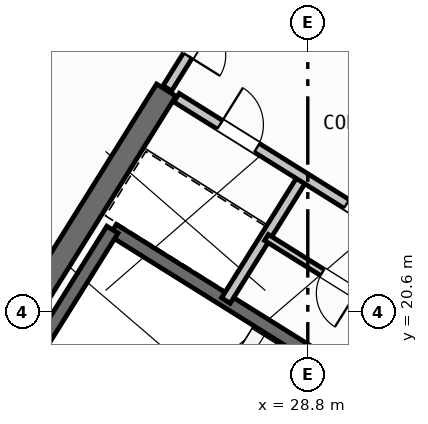
"""IFC4 building model, lengths in metres.
Left out: names, types, materials, properties, quantities, classifications, styles, units other than length and angle.
Written with IfcOpenShell. Run it as: python <this file> out.ifc"""

import sys

from ifc_helpers import new_model, si_unit, direction, frame, frame_2d, origin, place, context, subcontext, project, spatial, rectangle, extrude, source, transform, mapped, element, fill, save


model = new_model("IFC4")
c1 = context("Model", 3, precision=1e-05, world=origin(), true_north=direction((0.0, 1.0)))
c2 = subcontext(c1, "Body", "Model", "MODEL_VIEW")
j1 = project(units=[si_unit("LENGTHUNIT", "METRE"), si_unit("PLANEANGLEUNIT", "RADIAN")], contexts=[c1])
p1 = place(None, origin())
s1 = spatial("IfcSite", under=j1, at=p1, CompositionType="ELEMENT")
p2 = place(p1, origin())
s2 = spatial("IfcBuilding", under=s1, at=p2, CompositionType="ELEMENT")
p3 = place(p2, frame((0.0, 0.0, 262.8)))
s3 = spatial("IfcBuildingStorey", under=s2, at=p3, CompositionType="ELEMENT", Elevation=262.8)
p4 = place(p3, frame((40.531, 24.036, 0.0), z_axis=(0.0, 0.0, 1.0), x_axis=(-0.848048787466, 0.529918157905, 0.0)))
e1 = element("IfcWall", 1, at=p4, inside=s3, PredefinedType="SHEAR", context=c2, shape_type="SweptSolid", body=[
    extrude(rectangle(XDim=13.04, YDim=0.45, at=frame_2d((6.52, 0.0))), origin(), (0.0, 0.0, 1.0), 3.35),
])
p5 = place(p3, frame((26.007, 24.976, 0.0), z_axis=(0.0, 0.0, 1.0), x_axis=(-0.529931155655, -0.848040665456, 0.0)))
e2 = element("IfcWall", 2, at=p5, inside=s3, PredefinedType="SHEAR", context=c2, shape_type="SweptSolid", body=[
    extrude(rectangle(XDim=6.475, YDim=0.45, at=frame_2d((3.238, 0.0))), origin(), (0.0, 0.0, 1.0), 3.35),
])
p6 = place(p3, frame((29.268, 6.429, 0.0), z_axis=(0.0, 0.0, 1.0), x_axis=(-0.848049971435, 0.529916263149, 0.0)))
e3 = element("IfcWall", 3, at=p6, inside=s3, PredefinedType="STANDARD", context=c2, shape_type="SweptSolid", body=[
    extrude(rectangle(XDim=31.588, YDim=0.32, at=frame_2d((15.794, 0.0))), origin(), (0.0, 0.0, 1.0), 3.35),
])
p7 = place(p6, frame((16.362, 0.0, 0.0)))
e4 = element("IfcOpeningElement", 4, at=p7, cuts=e3, PredefinedType="OPENING", context=c2, shape_type="SweptSolid", body=[
    extrude(rectangle(XDim=1.2, YDim=2.15, at=frame_2d((0.6, 1.075))), frame((0.0, 0.17, 0.0), z_axis=(0.0, -1.0, 0.0), x_axis=(1.0, 0.0, 0.0)), (0.0, 0.0, 1.0), 0.34),
])
p8 = place(p6, frame((3.859, 0.0, 0.9)))
e5 = element("IfcOpeningElement", 5, at=p8, cuts=e3, PredefinedType="OPENING", context=c2, shape_type="SweptSolid", body=[
    extrude(rectangle(XDim=1.65, YDim=1.45, at=frame_2d((0.825, 0.725))), frame((0.0, 0.17, 0.0), z_axis=(0.0, -1.0, 0.0), x_axis=(1.0, 0.0, 0.0)), (0.0, 0.0, 1.0), 0.34),
])
p9 = place(p6, frame((10.519, 0.0, 0.9)))
e6 = element("IfcOpeningElement", 6, at=p9, cuts=e3, PredefinedType="OPENING", context=c2, shape_type="SweptSolid", body=[
    extrude(rectangle(XDim=1.65, YDim=1.45, at=frame_2d((0.825, 0.725))), frame((0.0, 0.17, 0.0), z_axis=(0.0, -1.0, 0.0), x_axis=(1.0, 0.0, 0.0)), (0.0, 0.0, 1.0), 0.34),
])
p10 = place(p6, frame((20.015, 0.0, 0.95)))
e7 = element("IfcOpeningElement", 7, at=p10, cuts=e3, PredefinedType="OPENING", context=c2, shape_type="SweptSolid", body=[
    extrude(rectangle(XDim=1.95, YDim=1.35, at=frame_2d((0.975, 0.675))), frame((0.0, 0.17, 0.0), z_axis=(0.0, -1.0, 0.0), x_axis=(1.0, 0.0, 0.0)), (0.0, 0.0, 1.0), 0.34),
])
p11 = place(p6, frame((23.715, 0.0, 1.0)))
e8 = element("IfcOpeningElement", 8, at=p11, cuts=e3, PredefinedType="OPENING", context=c2, shape_type="SweptSolid", body=[
    extrude(rectangle(XDim=0.9, YDim=1.25, at=frame_2d((0.45, 0.625))), frame((0.0, 0.17, 0.0), z_axis=(0.0, -1.0, 0.0), x_axis=(1.0, 0.0, 0.0)), (0.0, 0.0, 1.0), 0.34),
])
p12 = place(p6, frame((26.391, 0.0, 0.9)))
e9 = element("IfcOpeningElement", 9, at=p12, cuts=e3, PredefinedType="OPENING", context=c2, shape_type="SweptSolid", body=[
    extrude(rectangle(XDim=1.65, YDim=1.45, at=frame_2d((0.825, 0.725))), frame((0.0, 0.17, 0.0), z_axis=(0.0, -1.0, 0.0), x_axis=(1.0, 0.0, 0.0)), (0.0, 0.0, 1.0), 0.34),
])
p13 = place(p6, frame((29.878, 0.0, 1.0)))
e10 = element("IfcOpeningElement", 10, at=p13, cuts=e3, PredefinedType="OPENING", context=c2, shape_type="SweptSolid", body=[
    extrude(rectangle(XDim=0.9, YDim=1.25, at=frame_2d((0.45, 0.625))), frame((0.0, 0.17, 0.0), z_axis=(0.0, -1.0, 0.0), x_axis=(1.0, 0.0, 0.0)), (0.0, 0.0, 1.0), 0.34),
])
p14 = place(p3, frame((14.138, 41.825, 0.0), z_axis=(0.0, 0.0, 1.0), x_axis=(0.848046498049, -0.529921821731, 0.0)))
e11 = element("IfcWall", 11, at=p14, inside=s3, PredefinedType="STANDARD", context=c2, shape_type="SweptSolid", body=[
    extrude(rectangle(XDim=31.588, YDim=0.32, at=frame_2d((15.794, 0.0))), origin(), (0.0, 0.0, 1.0), 3.35),
])
p15 = place(p14, frame((3.568, 0.0, 0.0)))
e12 = element("IfcOpeningElement", 12, at=p15, cuts=e11, PredefinedType="OPENING", context=c2, shape_type="SweptSolid", body=[
    extrude(rectangle(XDim=1.05, YDim=2.15, at=frame_2d((0.525, 1.075))), frame((0.0, 0.17, 0.0), z_axis=(0.0, -1.0, 0.0), x_axis=(1.0, 0.0, 0.0)), (0.0, 0.0, 1.0), 0.34),
])
p16 = place(p14, frame((1.046, 0.0, 0.9)))
e13 = element("IfcOpeningElement", 13, at=p16, cuts=e11, PredefinedType="OPENING", context=c2, shape_type="SweptSolid", body=[
    extrude(rectangle(XDim=1.65, YDim=1.45, at=frame_2d((0.825, 0.725))), frame((0.0, 0.17, 0.0), z_axis=(0.0, -1.0, 0.0), x_axis=(1.0, 0.0, 0.0)), (0.0, 0.0, 1.0), 0.34),
])
p17 = place(p14, frame((8.61, 0.0, 0.9)))
e14 = element("IfcOpeningElement", 14, at=p17, cuts=e11, PredefinedType="OPENING", context=c2, shape_type="SweptSolid", body=[
    extrude(rectangle(XDim=1.35, YDim=1.45, at=frame_2d((0.675, 0.725))), frame((0.0, 0.17, 0.0), z_axis=(0.0, -1.0, 0.0), x_axis=(1.0, 0.0, 0.0)), (0.0, 0.0, 1.0), 0.34),
])
p18 = place(p14, frame((13.599, 0.0, 0.95)))
e15 = element("IfcOpeningElement", 15, at=p18, cuts=e11, PredefinedType="OPENING", context=c2, shape_type="SweptSolid", body=[
    extrude(rectangle(XDim=1.95, YDim=1.35, at=frame_2d((0.975, 0.675))), frame((0.0, 0.17, 0.0), z_axis=(0.0, -1.0, 0.0), x_axis=(1.0, 0.0, 0.0)), (0.0, 0.0, 1.0), 0.34),
])
p19 = place(p14, frame((17.154, 0.0, 1.0)))
e16 = element("IfcOpeningElement", 16, at=p19, cuts=e11, PredefinedType="OPENING", context=c2, shape_type="SweptSolid", body=[
    extrude(rectangle(XDim=0.9, YDim=1.25, at=frame_2d((0.45, 0.625))), frame((0.0, 0.17, 0.0), z_axis=(0.0, -1.0, 0.0), x_axis=(1.0, 0.0, 0.0)), (0.0, 0.0, 1.0), 0.34),
])
p20 = place(p14, frame((21.719, 0.0, 0.9)))
e17 = element("IfcOpeningElement", 17, at=p20, cuts=e11, PredefinedType="OPENING", context=c2, shape_type="SweptSolid", body=[
    extrude(rectangle(XDim=1.65, YDim=1.45, at=frame_2d((0.825, 0.725))), frame((0.0, 0.17, 0.0), z_axis=(0.0, -1.0, 0.0), x_axis=(1.0, 0.0, 0.0)), (0.0, 0.0, 1.0), 0.34),
])
p21 = place(p14, frame((27.419, 0.0, 0.9)))
e18 = element("IfcOpeningElement", 18, at=p21, cuts=e11, PredefinedType="OPENING", context=c2, shape_type="SweptSolid", body=[
    extrude(rectangle(XDim=1.65, YDim=1.45, at=frame_2d((0.825, 0.725))), frame((0.0, 0.17, 0.0), z_axis=(0.0, -1.0, 0.0), x_axis=(1.0, 0.0, 0.0)), (0.0, 0.0, 1.0), 0.34),
])
p22 = place(p3, frame((31.28, 18.261, 0.0), z_axis=(0.0, 0.0, 1.0), x_axis=(-0.848051618787, 0.529913626805, 0.0)))
e19 = element("IfcWall", 19, at=p22, inside=s3, PredefinedType="SHEAR", context=c2, shape_type="SweptSolid", body=[
    extrude(rectangle(XDim=7.46, YDim=0.26, at=frame_2d((3.73, 0.0))), origin(), (0.0, 0.0, 1.0), 3.35),
])
p23 = place(p22, frame((0.36, 0.0, 0.0)))
e20 = element("IfcOpeningElement", 20, at=p23, cuts=e19, PredefinedType="OPENING", context=c2, shape_type="SweptSolid", body=[
    extrude(rectangle(XDim=0.86, YDim=2.05, at=frame_2d((0.43, 1.025))), frame((0.0, 0.14, 0.0), z_axis=(0.0, -1.0, 0.0), x_axis=(1.0, 0.0, 0.0)), (0.0, 0.0, 1.0), 0.28),
])
p24 = place(p3, frame((24.945, 22.22, 0.0), z_axis=(0.0, 0.0, 1.0), x_axis=(-0.529908658664, -0.84805472316, 0.0)))
e21 = element("IfcWall", 21, at=p24, inside=s3, PredefinedType="SHEAR", context=c2, shape_type="SweptSolid", body=[
    extrude(rectangle(XDim=3.16, YDim=0.26, at=frame_2d((1.58, 0.0))), origin(), (0.0, 0.0, 1.0), 3.35),
])
p25 = place(p3, frame((31.822, 24.998, 0.0), z_axis=(0.0, 0.0, 1.0), x_axis=(-0.848054125777, 0.529909614701, 0.0)))
e22 = element("IfcWall", 22, at=p25, inside=s3, PredefinedType="STANDARD", context=c2, shape_type="SweptSolid", body=[
    extrude(rectangle(XDim=4.668, YDim=0.2, at=frame_2d((2.334, 0.0))), origin(), (0.0, 0.0, 1.0), 3.34),
])
p26 = place(p25, frame((0.52, 0.0, 0.0)))
e23 = element("IfcOpeningElement", 23, at=p26, cuts=e22, PredefinedType="OPENING", context=c2, shape_type="SweptSolid", body=[
    extrude(rectangle(XDim=1.2, YDim=2.15, at=frame_2d((0.6, 1.075))), frame((0.0, 0.11, 0.0), z_axis=(0.0, -1.0, 0.0), x_axis=(1.0, 0.0, 0.0)), (0.0, 0.0, 1.0), 0.22),
])
p27 = place(p25, frame((2.54, 0.0, 0.0)))
e24 = element("IfcOpeningElement", 24, at=p27, cuts=e22, PredefinedType="OPENING", context=c2, shape_type="SweptSolid", body=[
    extrude(rectangle(XDim=1.2, YDim=2.15, at=frame_2d((0.6, 1.075))), frame((0.0, 0.11, 0.0), z_axis=(0.0, -1.0, 0.0), x_axis=(1.0, 0.0, 0.0)), (0.0, 0.0, 1.0), 0.22),
])
p28 = place(p3, frame((28.71, 23.263, 0.0), z_axis=(0.0, 0.0, 1.0), x_axis=(-0.529907497854, -0.848055448493, 0.0)))
e25 = element("IfcWall", 25, at=p28, inside=s3, PredefinedType="STANDARD", context=c2, shape_type="SweptSolid", body=[
    extrude(rectangle(XDim=2.88, YDim=0.2, at=frame_2d((1.44, 0.0))), origin(), (0.0, 0.0, 1.0), 3.34),
])
p29 = place(p3, frame((31.525, 21.504, 0.0), z_axis=(0.0, 0.0, 1.0), x_axis=(-0.848042066329, 0.529928913853, 0.0)))
e26 = element("IfcWall", 26, at=p29, inside=s3, PredefinedType="STANDARD", context=c2, shape_type="SweptSolid", body=[
    extrude(rectangle(XDim=6.268, YDim=0.2, at=frame_2d((3.134, 0.0))), origin(), (0.0, 0.0, 1.0), 3.34),
])
p30 = place(p29, frame((4.4, 0.0, 0.0)))
e27 = element("IfcOpeningElement", 27, at=p30, cuts=e26, PredefinedType="OPENING", context=c2, shape_type="SweptSolid", body=[
    extrude(rectangle(XDim=0.86, YDim=2.05, at=frame_2d((0.43, 1.025))), frame((0.0, 0.11, 0.0), z_axis=(0.0, -1.0, 0.0), x_axis=(1.0, 0.0, 0.0)), (0.0, 0.0, 1.0), 0.22),
])
p31 = place(p29, frame((1.45, 0.0, 0.0)))
e28 = element("IfcOpeningElement", 28, at=p31, cuts=e26, PredefinedType="OPENING", context=c2, shape_type="SweptSolid", body=[
    extrude(rectangle(XDim=0.86, YDim=2.05, at=frame_2d((0.43, 1.025))), frame((0.0, 0.11, 0.0), z_axis=(0.0, -1.0, 0.0), x_axis=(1.0, 0.0, 0.0)), (0.0, 0.0, 1.0), 0.22),
])
p32 = place(p3, frame((30.766, 20.327, 0.0), z_axis=(0.0, 0.0, 1.0), x_axis=(-0.848052663127, 0.529911955482, 0.0)))
e29 = element("IfcWall", 29, at=p32, inside=s3, PredefinedType="PLUMBINGWALL", context=c2, shape_type="SweptSolid", body=[
    extrude(rectangle(XDim=3.28, YDim=0.14, at=frame_2d((1.64, 0.0))), origin(), (0.0, 0.0, 1.0), 3.34),
])
p33 = place(p32, frame((1.2, 0.0, 0.0)))
e30 = element("IfcOpeningElement", 30, at=p33, cuts=e29, PredefinedType="OPENING", context=c2, shape_type="SweptSolid", body=[
    extrude(rectangle(XDim=0.78, YDim=2.05, at=frame_2d((0.39, 1.025))), frame((0.0, 0.08, 0.0), z_axis=(0.0, -1.0, 0.0), x_axis=(1.0, 0.0, 0.0)), (0.0, 0.0, 1.0), 0.16),
])
p34 = place(p3, frame((27.596, 27.52, 0.0), z_axis=(0.0, 0.0, 1.0), x_axis=(-0.529865479138, -0.848081702443, 0.0)))
e31 = element("IfcWall", 31, at=p34, inside=s3, PredefinedType="STANDARD", context=c2, shape_type="SweptSolid", body=[
    extrude(rectangle(XDim=2.96, YDim=0.2, at=frame_2d((1.48, 0.0))), origin(), (0.0, 0.0, 1.0), 3.34),
])
p35 = place(p34, frame((0.7, 0.0, 0.0)))
e32 = element("IfcOpeningElement", 32, at=p35, cuts=e31, PredefinedType="OPENING", context=c2, shape_type="SweptSolid", body=[
    extrude(rectangle(XDim=1.5, YDim=2.15, at=frame_2d((0.75, 1.075))), frame((0.0, 0.11, 0.0), z_axis=(0.0, -1.0, 0.0), x_axis=(1.0, 0.0, 0.0)), (0.0, 0.0, 1.0), 0.22),
])
p36 = place(p3, frame((25.198, 28.606, 0.0), z_axis=(0.0, 0.0, 1.0), x_axis=(-0.529921796515, -0.848046513806, 0.0)))
e33 = element("IfcWall", 33, at=p36, inside=s3, PredefinedType="PARTITIONING", context=c2, shape_type="SweptSolid", body=[
    extrude(rectangle(XDim=16.5, YDim=0.16, at=frame_2d((8.25, 0.0))), origin(), (0.0, 0.0, 1.0), 3.34),
])
m1 = source(origin(), c2, "Body", "SweptSolid", [
    extrude(rectangle(XDim=0.86, YDim=2.05, at=frame_2d((0.43, 1.025))), frame((0.0, 0.025, 0.0), z_axis=(0.0, -1.0, 0.0), x_axis=(1.0, 0.0, 0.0)), (0.0, 0.0, 1.0), 0.05),
])
p37 = place(p30, frame((0.86, 0.0, 0.0), z_axis=(0.0, 0.0, 1.0), x_axis=(-1.0, 0.0, 0.0)))
e34 = element("IfcDoor", 34, at=p37, inside=s3, OperationType="SINGLE_SWING_LEFT", PredefinedType="DOOR", context=c2, shape_type="MappedRepresentation", body=[
    mapped(m1, transform((0.0, 0.0, 0.0), scale=1.0)),
])
fill(e27, e34)
p38 = place(p31, frame((0.86, 0.0, 0.0), z_axis=(0.0, 0.0, 1.0), x_axis=(-1.0, 0.0, 0.0)))
e35 = element("IfcDoor", 35, at=p38, inside=s3, OperationType="SINGLE_SWING_RIGHT", PredefinedType="DOOR", context=c2, shape_type="MappedRepresentation", body=[
    mapped(m1, transform((0.0, 0.0, 0.0), scale=1.0)),
])
fill(e28, e35)
m2 = source(origin(), c2, "Body", "SweptSolid", [
    extrude(rectangle(XDim=0.78, YDim=2.05, at=frame_2d((0.39, 1.025))), frame((0.0, 0.025, 0.0), z_axis=(0.0, -1.0, 0.0), x_axis=(1.0, 0.0, 0.0)), (0.0, 0.0, 1.0), 0.05),
])
p39 = place(p33, origin())
e36 = element("IfcDoor", 36, at=p39, inside=s3, OperationType="SINGLE_SWING_LEFT", PredefinedType="DOOR", context=c2, shape_type="MappedRepresentation", body=[
    mapped(m2, transform((0.0, 0.0, 0.0), scale=1.0)),
])
fill(e30, e36)
m3 = source(origin(), c2, "Body", "SweptSolid", [
    extrude(rectangle(XDim=1.5, YDim=2.15, at=frame_2d((0.75, 1.075))), frame((0.0, 0.025, 0.0), z_axis=(0.0, -1.0, 0.0), x_axis=(1.0, 0.0, 0.0)), (0.0, 0.0, 1.0), 0.05),
])
p40 = place(p35, origin())
e37 = element("IfcDoor", 37, at=p40, inside=s3, OperationType="DOUBLE_DOOR_SINGLE_SWING", PredefinedType="DOOR", context=c2, shape_type="MappedRepresentation", body=[
    mapped(m3, transform((0.0, 0.0, 0.0), scale=1.0)),
])
fill(e32, e37)
save(model, sys.argv[1])
